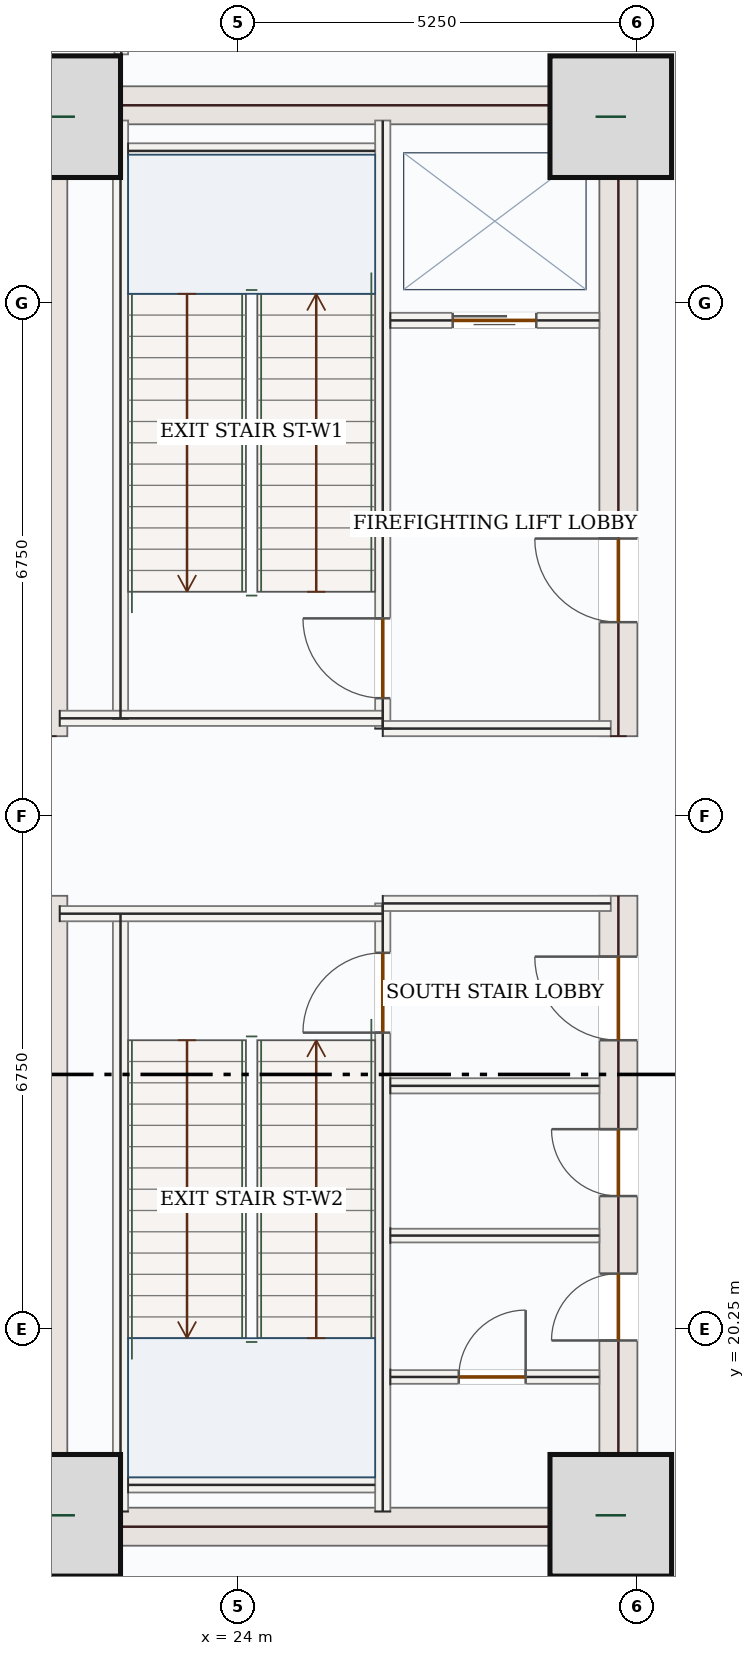
"""IFC4 building model, lengths in metres.
Left out: names, types, materials, properties, quantities, classifications, styles, units other than length and angle.
Written with IfcOpenShell. Run it as: python <this file> out.ifc"""

import sys

from ifc_helpers import new_model, si_unit, direction, frame, frame_2d, origin, origin_2d, place, context, subcontext, project, spatial, rectangle, extrude, source, transform, mapped, element, fill, save


model = new_model("IFC4")
c1 = context("Model", 3, precision=1e-05, world=origin(), true_north=direction((0.0, 1.0)))
c2 = subcontext(c1, "Body", "Model", "MODEL_VIEW")
j1 = project(units=[si_unit("LENGTHUNIT", "METRE"), si_unit("PLANEANGLEUNIT", "RADIAN")], contexts=[c1])
p1 = place(None, origin())
s1 = spatial("IfcSite", under=j1, at=p1, CompositionType="ELEMENT")
p2 = place(p1, origin())
s2 = spatial("IfcBuilding", under=s1, at=p2, CompositionType="ELEMENT")
p3 = place(p2, frame((0.0, 0.0, -5.4)))
s3 = spatial("IfcBuildingStorey", under=s2, at=p3, CompositionType="ELEMENT", Elevation=-5.4)
m1 = source(origin(), c2, "Body", "SweptSolid", [
    extrude(rectangle(XDim=8.55, YDim=0.5, at=frame_2d((4.275, 0.0))), origin(), (0.0, 0.0, 1.0), 4.95),
])
for number, where, z_axis, x_axis in (
    (1, (21.5, 17.4, 0.0), (0.0, 0.0, 1.0), (0.0, 1.0, 0.0)),
    (2, (21.5, 28.05, 0.0), (0.0, 0.0, 1.0), (0.0, 1.0, 0.0)),
):
    element("IfcWall", number, at=place(p3, frame(where, z_axis=z_axis, x_axis=x_axis)), inside=s3, PredefinedType="SHEAR", context=c2, shape_type="MappedRepresentation", body=[
        mapped(m1, transform((0.0, 0.0, 0.0), x_axis=(1.0, 0.0, 0.0), y_axis=(0.0, 1.0, 0.0), z_axis=(0.0, 0.0, 1.0), scale=1.0)),
    ])
p4 = place(p3, frame((29.0, 17.4, 0.0), z_axis=(0.0, 0.0, 1.0), x_axis=(0.0, 1.0, 0.0)))
e3 = element("IfcWall", 3, at=p4, inside=s3, PredefinedType="SHEAR", context=c2, shape_type="SweptSolid", body=[
    extrude(rectangle(XDim=8.55, YDim=0.5, at=frame_2d((4.275, 0.0))), origin(), (0.0, 0.0, 1.0), 4.95),
])
p5 = place(p4, frame((6.65, 0.0, 0.0)))
e4 = element("IfcOpeningElement", 4, at=p5, cuts=e3, PredefinedType="OPENING", context=c2, shape_type="SweptSolid", body=[
    extrude(rectangle(XDim=1.1, YDim=2.2, at=frame_2d((0.55, 1.1))), frame((0.0, 0.26, 0.0), z_axis=(0.0, -1.0, 0.0), x_axis=(1.0, 0.0, 0.0)), (0.0, 0.0, 1.0), 0.52),
])
p6 = place(p4, frame((2.7, 0.0, 0.0)))
e5 = element("IfcOpeningElement", 5, at=p6, cuts=e3, PredefinedType="OPENING", context=c2, shape_type="SweptSolid", body=[
    extrude(rectangle(XDim=0.88, YDim=2.1, at=frame_2d((0.44, 1.05))), frame((0.0, 0.26, 0.0), z_axis=(0.0, -1.0, 0.0), x_axis=(1.0, 0.0, 0.0)), (0.0, 0.0, 1.0), 0.52),
])
p7 = place(p4, frame((4.6, 0.0, 0.0)))
e6 = element("IfcOpeningElement", 6, at=p7, cuts=e3, PredefinedType="OPENING", context=c2, shape_type="SweptSolid", body=[
    extrude(rectangle(XDim=0.88, YDim=2.1, at=frame_2d((0.44, 1.05))), frame((0.0, 0.26, 0.0), z_axis=(0.0, -1.0, 0.0), x_axis=(1.0, 0.0, 0.0)), (0.0, 0.0, 1.0), 0.52),
])
p8 = place(p3, frame((29.0, 28.05, 0.0), z_axis=(0.0, 0.0, 1.0), x_axis=(0.0, 1.0, 0.0)))
e7 = element("IfcWall", 7, at=p8, inside=s3, PredefinedType="SHEAR", context=c2, shape_type="SweptSolid", body=[
    extrude(rectangle(XDim=8.55, YDim=0.5, at=frame_2d((4.275, 0.0))), origin(), (0.0, 0.0, 1.0), 4.95),
])
p9 = place(p8, frame((1.5, 0.0, 0.0)))
e8 = element("IfcOpeningElement", 8, at=p9, cuts=e7, PredefinedType="OPENING", context=c2, shape_type="SweptSolid", body=[
    extrude(rectangle(XDim=1.1, YDim=2.2, at=frame_2d((0.55, 1.1))), frame((0.0, 0.26, 0.0), z_axis=(0.0, -1.0, 0.0), x_axis=(1.0, 0.0, 0.0)), (0.0, 0.0, 1.0), 0.52),
])
m2 = source(origin(), c2, "Body", "SweptSolid", [
    extrude(rectangle(XDim=7.0, YDim=0.5, at=frame_2d((3.5, 0.0))), origin(), (0.0, 0.0, 1.0), 4.95),
])
for number, where, z_axis, x_axis in (
    (9, (21.75, 17.65, 0.0), (0.0, 0.0, 1.0), (1.0, 0.0, 0.0)),
    (10, (21.75, 36.35, 0.0), (0.0, 0.0, 1.0), (1.0, 0.0, 0.0)),
):
    element("IfcWall", number, at=place(p3, frame(where, z_axis=z_axis, x_axis=x_axis)), inside=s3, PredefinedType="SHEAR", context=c2, shape_type="MappedRepresentation", body=[
        mapped(m2, transform((0.0, 0.0, 0.0), x_axis=(1.0, 0.0, 0.0), y_axis=(0.0, 1.0, 0.0), z_axis=(0.0, 0.0, 1.0), scale=1.0)),
    ])
m3 = source(origin(), c2, "Body", "SweptSolid", [
    extrude(rectangle(XDim=1.6, YDim=1.6, at=origin_2d()), origin(), (0.0, 0.0, 1.0), 5.4),
])
for number, where, z_axis, x_axis in (
    (11, (21.65, 17.8, 0.0), (0.0, 0.0, 1.0), (1.0, 0.0, 0.0)),
    (12, (28.9, 17.8, 0.0), (0.0, 0.0, 1.0), (1.0, 0.0, 0.0)),
    (13, (21.65, 36.2, 0.0), (0.0, 0.0, 1.0), (1.0, 0.0, 0.0)),
    (14, (28.9, 36.2, 0.0), (0.0, 0.0, 1.0), (1.0, 0.0, 0.0)),
):
    element("IfcColumn", number, at=place(p3, frame(where, z_axis=z_axis, x_axis=x_axis)), inside=s3, PredefinedType="COLUMN", context=c2, shape_type="MappedRepresentation", body=[
        mapped(m3, transform((0.0, 0.0, 0.0), x_axis=(1.0, 0.0, 0.0), y_axis=(0.0, 1.0, 0.0), z_axis=(0.0, 0.0, 1.0), scale=1.0)),
    ])
m4 = source(origin(), c2, "Body", "SweptSolid", [
    extrude(rectangle(XDim=7.87, YDim=0.2, at=frame_2d((3.935, 0.0))), origin(), (0.0, 0.0, 1.0), 4.95),
])
for number, where, z_axis, x_axis in (
    (15, (22.45, 17.85, 0.0), (0.0, 0.0, 1.0), (0.0, 1.0, 0.0)),
    (16, (22.45, 28.28, 0.0), (0.0, 0.0, 1.0), (0.0, 1.0, 0.0)),
):
    element("IfcWall", number, at=place(p3, frame(where, z_axis=z_axis, x_axis=x_axis)), inside=s3, PredefinedType="SOLIDWALL", context=c2, shape_type="MappedRepresentation", body=[
        mapped(m4, transform((0.0, 0.0, 0.0), x_axis=(1.0, 0.0, 0.0), y_axis=(0.0, 1.0, 0.0), z_axis=(0.0, 0.0, 1.0), scale=1.0)),
    ])
p10 = place(p3, frame((25.9, 17.85, 0.0), z_axis=(0.0, 0.0, 1.0), x_axis=(0.0, 1.0, 0.0)))
e17 = element("IfcWall", 17, at=p10, inside=s3, PredefinedType="SOLIDWALL", context=c2, shape_type="SweptSolid", body=[
    extrude(rectangle(XDim=8.0, YDim=0.2, at=frame_2d((4.0, 0.0))), origin(), (0.0, 0.0, 1.0), 4.95),
])
p11 = place(p10, frame((6.3, 0.0, 0.0)))
e18 = element("IfcOpeningElement", 18, at=p11, cuts=e17, PredefinedType="OPENING", context=c2, shape_type="SweptSolid", body=[
    extrude(rectangle(XDim=1.05, YDim=2.15, at=frame_2d((0.525, 1.075))), frame((0.0, 0.11, 0.0), z_axis=(0.0, -1.0, 0.0), x_axis=(1.0, 0.0, 0.0)), (0.0, 0.0, 1.0), 0.22),
])
p12 = place(p3, frame((25.9, 28.15, 0.0), z_axis=(0.0, 0.0, 1.0), x_axis=(0.0, 1.0, 0.0)))
e19 = element("IfcWall", 19, at=p12, inside=s3, PredefinedType="SOLIDWALL", context=c2, shape_type="SweptSolid", body=[
    extrude(rectangle(XDim=8.0, YDim=0.2, at=frame_2d((4.0, 0.0))), origin(), (0.0, 0.0, 1.0), 4.95),
])
p13 = place(p12, frame((0.4, 0.0, 0.0)))
e20 = element("IfcOpeningElement", 20, at=p13, cuts=e19, PredefinedType="OPENING", context=c2, shape_type="SweptSolid", body=[
    extrude(rectangle(XDim=1.05, YDim=2.15, at=frame_2d((0.525, 1.075))), frame((0.0, 0.11, 0.0), z_axis=(0.0, -1.0, 0.0), x_axis=(1.0, 0.0, 0.0)), (0.0, 0.0, 1.0), 0.22),
])
m5 = source(origin(), c2, "Body", "SweptSolid", [
    extrude(rectangle(XDim=4.25, YDim=0.2, at=frame_2d((2.125, 0.0))), origin(), (0.0, 0.0, 1.0), 4.95),
])
p14 = place(p3, frame((21.65, 25.715, 0.0), z_axis=(0.0, 0.0, 1.0), x_axis=(1.0, 0.0, 0.0)))
e21 = element("IfcWall", 21, at=p14, inside=s3, PredefinedType="SOLIDWALL", context=c2, shape_type="MappedRepresentation", body=[
    mapped(m5, transform((0.0, 0.0, 0.0), x_axis=(1.0, 0.0, 0.0), y_axis=(0.0, 1.0, 0.0), z_axis=(0.0, 0.0, 1.0), scale=1.0)),
])
m6 = source(origin(), c2, "Body", "SweptSolid", [
    extrude(rectangle(XDim=3.0, YDim=0.2, at=frame_2d((1.5, 0.0))), origin(), (0.0, 0.0, 1.0), 4.95),
])
p15 = place(p3, frame((25.9, 25.85, 0.0), z_axis=(0.0, 0.0, 1.0), x_axis=(1.0, 0.0, 0.0)))
e22 = element("IfcWall", 22, at=p15, inside=s3, PredefinedType="SOLIDWALL", context=c2, shape_type="MappedRepresentation", body=[
    mapped(m6, transform((0.0, 0.0, 0.0), x_axis=(1.0, 0.0, 0.0), y_axis=(0.0, 1.0, 0.0), z_axis=(0.0, 0.0, 1.0), scale=1.0)),
])
p16 = place(p3, frame((21.65, 28.285, 0.0), z_axis=(0.0, 0.0, 1.0), x_axis=(1.0, 0.0, 0.0)))
e23 = element("IfcWall", 23, at=p16, inside=s3, PredefinedType="SOLIDWALL", context=c2, shape_type="MappedRepresentation", body=[
    mapped(m5, transform((0.0, 0.0, 0.0), x_axis=(1.0, 0.0, 0.0), y_axis=(0.0, 1.0, 0.0), z_axis=(0.0, 0.0, 1.0), scale=1.0)),
])
p17 = place(p3, frame((25.9, 28.15, 0.0), z_axis=(0.0, 0.0, 1.0), x_axis=(1.0, 0.0, 0.0)))
e24 = element("IfcWall", 24, at=p17, inside=s3, PredefinedType="SOLIDWALL", context=c2, shape_type="MappedRepresentation", body=[
    mapped(m6, transform((0.0, 0.0, 0.0), x_axis=(1.0, 0.0, 0.0), y_axis=(0.0, 1.0, 0.0), z_axis=(0.0, 0.0, 1.0), scale=1.0)),
])
m7 = source(origin(), c2, "Body", "SweptSolid", [
    extrude(rectangle(XDim=3.25, YDim=0.2, at=frame_2d((1.625, 0.0))), origin(), (0.0, 0.0, 1.0), 4.95),
])
for number, where, z_axis, x_axis in (
    (25, (22.55, 35.75, 0.0), (0.0, 0.0, 1.0), (1.0, 0.0, 0.0)),
    (26, (22.55, 18.2, 0.0), (0.0, 0.0, 1.0), (1.0, 0.0, 0.0)),
):
    element("IfcWall", number, at=place(p3, frame(where, z_axis=z_axis, x_axis=x_axis)), inside=s3, PredefinedType="SOLIDWALL", context=c2, shape_type="MappedRepresentation", body=[
        mapped(m7, transform((0.0, 0.0, 0.0), x_axis=(1.0, 0.0, 0.0), y_axis=(0.0, 1.0, 0.0), z_axis=(0.0, 0.0, 1.0), scale=1.0)),
    ])
p18 = place(p3, frame((26.0, 33.52, 0.0), z_axis=(0.0, 0.0, 1.0), x_axis=(1.0, 0.0, 0.0)))
e27 = element("IfcWall", 27, at=p18, inside=s3, PredefinedType="SOLIDWALL", context=c2, shape_type="SweptSolid", body=[
    extrude(rectangle(XDim=2.75, YDim=0.2, at=frame_2d((1.375, 0.0))), origin(), (0.0, 0.0, 1.0), 4.95),
])
p19 = place(p18, frame((0.82, 0.0, 0.0)))
e28 = element("IfcOpeningElement", 28, at=p19, cuts=e27, PredefinedType="OPENING", context=c2, shape_type="SweptSolid", body=[
    extrude(rectangle(XDim=1.1, YDim=2.15, at=frame_2d((0.55, 1.075))), frame((0.0, 0.11, 0.0), z_axis=(0.0, -1.0, 0.0), x_axis=(1.0, 0.0, 0.0)), (0.0, 0.0, 1.0), 0.22),
])
m8 = source(origin(), c2, "Body", "SweptSolid", [
    extrude(rectangle(XDim=2.75, YDim=0.2, at=frame_2d((1.375, 0.0))), origin(), (0.0, 0.0, 1.0), 4.95),
])
p20 = place(p3, frame((26.0, 23.45, 0.0), z_axis=(0.0, 0.0, 1.0), x_axis=(1.0, 0.0, 0.0)))
e29 = element("IfcWall", 29, at=p20, inside=s3, PredefinedType="SOLIDWALL", context=c2, shape_type="MappedRepresentation", body=[
    mapped(m8, transform((0.0, 0.0, 0.0), x_axis=(1.0, 0.0, 0.0), y_axis=(0.0, 1.0, 0.0), z_axis=(0.0, 0.0, 1.0), scale=1.0)),
])
p21 = place(p3, frame((26.0, 19.62, 0.0), z_axis=(0.0, 0.0, 1.0), x_axis=(1.0, 0.0, 0.0)))
e30 = element("IfcWall", 30, at=p21, inside=s3, PredefinedType="PARTITIONING", context=c2, shape_type="SweptSolid", body=[
    extrude(rectangle(XDim=2.75, YDim=0.18, at=frame_2d((1.375, 0.0))), origin(), (0.0, 0.0, 1.0), 4.95),
])
p22 = place(p21, frame((0.9, 0.0, 0.0)))
e31 = element("IfcOpeningElement", 31, at=p22, cuts=e30, PredefinedType="OPENING", context=c2, shape_type="SweptSolid", body=[
    extrude(rectangle(XDim=0.88, YDim=2.1, at=frame_2d((0.44, 1.05))), frame((0.0, 0.1, 0.0), z_axis=(0.0, -1.0, 0.0), x_axis=(1.0, 0.0, 0.0)), (0.0, 0.0, 1.0), 0.2),
])
m9 = source(origin(), c2, "Body", "SweptSolid", [
    extrude(rectangle(XDim=2.75, YDim=0.18, at=frame_2d((1.375, 0.0))), origin(), (0.0, 0.0, 1.0), 4.95),
])
p23 = place(p3, frame((26.0, 21.48, 0.0), z_axis=(0.0, 0.0, 1.0), x_axis=(1.0, 0.0, 0.0)))
e32 = element("IfcWall", 32, at=p23, inside=s3, PredefinedType="PARTITIONING", context=c2, shape_type="MappedRepresentation", body=[
    mapped(m9, transform((0.0, 0.0, 0.0), x_axis=(1.0, 0.0, 0.0), y_axis=(0.0, 1.0, 0.0), z_axis=(0.0, 0.0, 1.0), scale=1.0)),
])
m10 = source(origin(), c2, "Body", "SweptSolid", [
    extrude(rectangle(XDim=1.824, YDim=0.18, at=frame_2d((0.912, 0.0))), origin(), (0.0, 0.0, 1.0), 4.95),
])
p24 = place(p3, frame((22.46, 38.844, 0.0), z_axis=(0.0, 0.0, 1.0), x_axis=(0.0, -1.0, 0.0)))
e33 = element("IfcWall", 33, at=p24, inside=s3, PredefinedType="PARTITIONING", context=c2, shape_type="MappedRepresentation", body=[
    mapped(m10, transform((0.0, 0.0, 0.0), x_axis=(1.0, 0.0, 0.0), y_axis=(0.0, 1.0, 0.0), z_axis=(0.0, 0.0, 1.0), scale=1.0)),
])
m11 = source(origin(), c2, "Body", "SweptSolid", [
    extrude(rectangle(XDim=1.05, YDim=2.15, at=frame_2d((0.525, 1.075))), frame((0.0, 0.025, 0.0), z_axis=(0.0, -1.0, 0.0), x_axis=(1.0, 0.0, 0.0)), (0.0, 0.0, 1.0), 0.05),
])
p25 = place(p13, origin())
e34 = element("IfcDoor", 34, at=p25, inside=s3, OperationType="SINGLE_SWING_RIGHT", PredefinedType="DOOR", context=c2, shape_type="MappedRepresentation", body=[
    mapped(m11, transform((0.0, 0.0, 0.0), x_axis=(1.0, 0.0, 0.0), y_axis=(0.0, 1.0, 0.0), z_axis=(0.0, 0.0, 1.0), scale=1.0)),
])
fill(e20, e34)
p26 = place(p11, origin())
e35 = element("IfcDoor", 35, at=p26, inside=s3, OperationType="SINGLE_SWING_LEFT", PredefinedType="DOOR", context=c2, shape_type="MappedRepresentation", body=[
    mapped(m11, transform((0.0, 0.0, 0.0), x_axis=(1.0, 0.0, 0.0), y_axis=(0.0, 1.0, 0.0), z_axis=(0.0, 0.0, 1.0), scale=1.0)),
])
fill(e18, e35)
m12 = source(origin(), c2, "Body", "SweptSolid", [
    extrude(rectangle(XDim=1.1, YDim=2.15, at=frame_2d((0.55, 1.075))), frame((0.0, 0.025, 0.0), z_axis=(0.0, -1.0, 0.0), x_axis=(1.0, 0.0, 0.0)), (0.0, 0.0, 1.0), 0.05),
])
p27 = place(p19, origin())
e36 = element("IfcDoor", 36, at=p27, inside=s3, OperationType="DOUBLE_DOOR_SLIDING", PredefinedType="DOOR", context=c2, shape_type="MappedRepresentation", body=[
    mapped(m12, transform((0.0, 0.0, 0.0), x_axis=(1.0, 0.0, 0.0), y_axis=(0.0, 1.0, 0.0), z_axis=(0.0, 0.0, 1.0), scale=1.0)),
])
fill(e28, e36)
m13 = source(origin(), c2, "Body", "SweptSolid", [
    extrude(rectangle(XDim=1.1, YDim=2.2, at=frame_2d((0.55, 1.1))), frame((0.0, 0.025, 0.0), z_axis=(0.0, -1.0, 0.0), x_axis=(1.0, 0.0, 0.0)), (0.0, 0.0, 1.0), 0.05),
])
p28 = place(p9, origin())
e37 = element("IfcDoor", 37, at=p28, inside=s3, OperationType="SINGLE_SWING_RIGHT", PredefinedType="DOOR", context=c2, shape_type="MappedRepresentation", body=[
    mapped(m13, transform((0.0, 0.0, 0.0), x_axis=(1.0, 0.0, 0.0), y_axis=(0.0, 1.0, 0.0), z_axis=(0.0, 0.0, 1.0), scale=1.0)),
])
fill(e8, e37)
p29 = place(p5, origin())
e38 = element("IfcDoor", 38, at=p29, inside=s3, OperationType="SINGLE_SWING_RIGHT", PredefinedType="DOOR", context=c2, shape_type="MappedRepresentation", body=[
    mapped(m13, transform((0.0, 0.0, 0.0), x_axis=(1.0, 0.0, 0.0), y_axis=(0.0, 1.0, 0.0), z_axis=(0.0, 0.0, 1.0), scale=1.0)),
])
fill(e4, e38)
m14 = source(origin(), c2, "Body", "SweptSolid", [
    extrude(rectangle(XDim=0.88, YDim=2.1, at=frame_2d((0.44, 1.05))), frame((0.0, 0.025, 0.0), z_axis=(0.0, -1.0, 0.0), x_axis=(1.0, 0.0, 0.0)), (0.0, 0.0, 1.0), 0.05),
])
p30 = place(p22, origin())
e39 = element("IfcDoor", 39, at=p30, inside=s3, OperationType="SINGLE_SWING_RIGHT", PredefinedType="DOOR", context=c2, shape_type="MappedRepresentation", body=[
    mapped(m14, transform((0.0, 0.0, 0.0), x_axis=(1.0, 0.0, 0.0), y_axis=(0.0, 1.0, 0.0), z_axis=(0.0, 0.0, 1.0), scale=1.0)),
])
fill(e31, e39)
p31 = place(p6, origin())
e40 = element("IfcDoor", 40, at=p31, inside=s3, OperationType="SINGLE_SWING_LEFT", PredefinedType="DOOR", context=c2, shape_type="MappedRepresentation", body=[
    mapped(m14, transform((0.0, 0.0, 0.0), x_axis=(1.0, 0.0, 0.0), y_axis=(0.0, 1.0, 0.0), z_axis=(0.0, 0.0, 1.0), scale=1.0)),
])
fill(e5, e40)
p32 = place(p7, origin())
e41 = element("IfcDoor", 41, at=p32, inside=s3, OperationType="SINGLE_SWING_RIGHT", PredefinedType="DOOR", context=c2, shape_type="MappedRepresentation", body=[
    mapped(m14, transform((0.0, 0.0, 0.0), x_axis=(1.0, 0.0, 0.0), y_axis=(0.0, 1.0, 0.0), z_axis=(0.0, 0.0, 1.0), scale=1.0)),
])
fill(e6, e41)
save(model, sys.argv[1])
